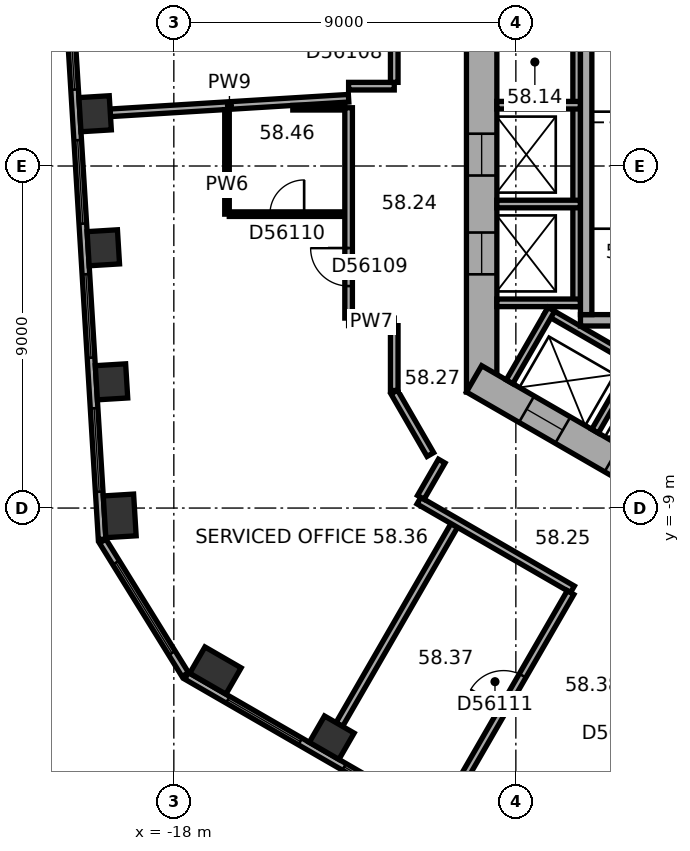
"""IFC4 building model, lengths in metres.
Left out: names, types, materials, properties, quantities, classifications, styles, units other than length and angle.
Written with IfcOpenShell. Run it as: python <this file> out.ifc"""

import sys

from ifc_helpers import new_model, si_unit, direction, frame, frame_2d, origin, origin_2d, place, context, subcontext, project, spatial, rectangle, extrude, element, fill, save


model = new_model("IFC4")
c1 = context("Model", 3, precision=1e-05, world=origin(), true_north=direction((0.0, 1.0)))
c2 = subcontext(c1, "Body", "Model", "MODEL_VIEW")
j1 = project(units=[si_unit("LENGTHUNIT", "METRE"), si_unit("PLANEANGLEUNIT", "RADIAN")], contexts=[c1])
p1 = place(None, origin())
s1 = spatial("IfcSite", under=j1, at=p1, CompositionType="ELEMENT")
p2 = place(p1, origin())
s2 = spatial("IfcBuilding", under=s1, at=p2, CompositionType="ELEMENT")
p3 = place(p2, frame((0.0, 0.0, 236.5)))
s3 = spatial("IfcBuildingStorey", under=s2, at=p3, CompositionType="ELEMENT", Elevation=236.5)
for number, where, z_axis, x_axis in (
    (1, (-20.071, 1.375, 0.0), (0.0, 0.0, 1.0), (0.061, -0.998, 0.0)),
    (2, (-19.856, -2.152, 0.0), (0.0, 0.0, 1.0), (0.061, -0.998, 0.0)),
    (3, (-19.64, -5.679, 0.0), (0.0, 0.0, 1.0), (0.061, -0.998, 0.0)),
):
    element("IfcColumn", number, at=place(p3, frame(where, z_axis=z_axis, x_axis=x_axis)), inside=s3, PredefinedType="COLUMN", context=c2, shape_type="SweptSolid", body=[
        extrude(rectangle(XDim=0.9, YDim=0.8, at=origin_2d()), origin(), (0.0, 0.0, 1.0), 3.7),
    ])
for number, where, z_axis, x_axis in (
    (4, (-19.424, -9.206, 0.0), (0.0, 0.0, 1.0), (0.061, -0.998, 0.0)),
    (5, (-16.906, -13.276, 0.0), (0.0, 0.0, 1.0), (0.866, -0.5, 0.0)),
):
    element("IfcColumn", number, at=place(p3, frame(where, z_axis=z_axis, x_axis=x_axis)), inside=s3, PredefinedType="COLUMN", context=c2, shape_type="SweptSolid", body=[
        extrude(rectangle(XDim=1.1, YDim=0.8, at=origin_2d()), origin(), (0.0, 0.0, 1.0), 3.7),
    ])
p4 = place(p3, frame((-13.845, -15.042, 0.0), z_axis=(0.0, 0.0, 1.0), x_axis=(0.866025403784, -0.5, 0.0)))
e6 = element("IfcColumn", 6, at=p4, inside=s3, PredefinedType="COLUMN", context=c2, shape_type="SweptSolid", body=[
    extrude(rectangle(XDim=0.9, YDim=0.8, at=origin_2d()), origin(), (0.0, 0.0, 1.0), 3.7),
])
p5 = place(p3, frame((-9.9, 5.947, 0.0), z_axis=(0.0, 0.0, 1.0), x_axis=(0.0, -1.0, 0.0)))
e7 = element("IfcWall", 7, at=p5, inside=s3, PredefinedType="SHEAR", context=c2, shape_type="SweptSolid", body=[
    extrude(rectangle(XDim=11.894, YDim=0.8, at=frame_2d((5.947, 0.0))), origin(), (0.0, 0.0, 1.0), 3.7),
])
p6 = place(p5, frame((5.097, 0.0, 0.0)))
e8 = element("IfcOpeningElement", 8, at=p6, cuts=e7, PredefinedType="OPENING", context=c2, shape_type="SweptSolid", body=[
    extrude(rectangle(XDim=1.1, YDim=2.1, at=frame_2d((0.55, 1.05))), frame((0.0, 0.41, 0.0), z_axis=(0.0, -1.0, 0.0), x_axis=(1.0, 0.0, 0.0)), (0.0, 0.0, 1.0), 0.82),
])
p7 = place(p5, frame((7.697, 0.0, 0.0)))
e9 = element("IfcOpeningElement", 9, at=p7, cuts=e7, PredefinedType="OPENING", context=c2, shape_type="SweptSolid", body=[
    extrude(rectangle(XDim=1.1, YDim=2.1, at=frame_2d((0.55, 1.05))), frame((0.0, 0.41, 0.0), z_axis=(0.0, -1.0, 0.0), x_axis=(1.0, 0.0, 0.0)), (0.0, 0.0, 1.0), 0.82),
])
p8 = place(p3, frame((-10.1, -5.6, 0.0), z_axis=(0.0, 0.0, 1.0), x_axis=(0.866023897231, -0.500002609418, 0.0)))
e10 = element("IfcWall", 10, at=p8, inside=s3, PredefinedType="SHEAR", context=c2, shape_type="SweptSolid", body=[
    extrude(rectangle(XDim=11.894, YDim=0.8, at=frame_2d((5.947, 0.0))), origin(), (0.0, 0.0, 1.0), 3.7),
])
p9 = place(p8, frame((6.147, 0.0, 0.0)))
e11 = element("IfcOpeningElement", 11, at=p9, cuts=e10, PredefinedType="OPENING", context=c2, shape_type="SweptSolid", body=[
    extrude(rectangle(XDim=1.5, YDim=2.1, at=frame_2d((0.75, 1.05))), frame((0.0, 0.41, 0.0), z_axis=(0.0, -1.0, 0.0), x_axis=(1.0, 0.0, 0.0)), (0.0, 0.0, 1.0), 0.82),
])
p10 = place(p8, frame((1.597, 0.0, 0.0)))
e12 = element("IfcOpeningElement", 12, at=p10, cuts=e10, PredefinedType="OPENING", context=c2, shape_type="SweptSolid", body=[
    extrude(rectangle(XDim=1.1, YDim=2.1, at=frame_2d((0.55, 1.05))), frame((0.0, 0.41, 0.0), z_axis=(0.0, -1.0, 0.0), x_axis=(1.0, 0.0, 0.0)), (0.0, 0.0, 1.0), 0.82),
])
p11 = place(p8, frame((4.197, 0.0, 0.0)))
e13 = element("IfcOpeningElement", 13, at=p11, cuts=e10, PredefinedType="OPENING", context=c2, shape_type="SweptSolid", body=[
    extrude(rectangle(XDim=1.1, YDim=2.1, at=frame_2d((0.55, 1.05))), frame((0.0, 0.41, 0.0), z_axis=(0.0, -1.0, 0.0), x_axis=(1.0, 0.0, 0.0)), (0.0, 0.0, 1.0), 0.82),
])
p12 = place(p3, frame((-21.038, 8.984, 0.0), z_axis=(0.0, 0.0, 1.0), x_axis=(0.061043935634, -0.998135079998, 0.0)))
e14 = element("IfcWall", 14, at=p12, inside=s3, PredefinedType="STANDARD", context=c2, shape_type="SweptSolid", body=[
    extrude(rectangle(XDim=18.841, YDim=0.2, at=frame_2d((9.421, 0.0))), origin(), (0.0, 0.0, 1.0), 3.7),
])
p13 = place(p12, frame((1.253, 0.0, 0.9)))
e15 = element("IfcOpeningElement", 15, at=p13, cuts=e14, PredefinedType="OPENING", context=c2, shape_type="SweptSolid", body=[
    extrude(rectangle(XDim=2.2, YDim=2.0, at=frame_2d((1.1, 1.0))), frame((0.0, 0.11, 0.0), z_axis=(0.0, -1.0, 0.0), x_axis=(1.0, 0.0, 0.0)), (0.0, 0.0, 1.0), 0.22),
])
p14 = place(p12, frame((4.786, 0.0, 0.9)))
e16 = element("IfcOpeningElement", 16, at=p14, cuts=e14, PredefinedType="OPENING", context=c2, shape_type="SweptSolid", body=[
    extrude(rectangle(XDim=2.2, YDim=2.0, at=frame_2d((1.1, 1.0))), frame((0.0, 0.11, 0.0), z_axis=(0.0, -1.0, 0.0), x_axis=(1.0, 0.0, 0.0)), (0.0, 0.0, 1.0), 0.22),
])
p15 = place(p12, frame((8.32, 0.0, 0.9)))
e17 = element("IfcOpeningElement", 17, at=p15, cuts=e14, PredefinedType="OPENING", context=c2, shape_type="SweptSolid", body=[
    extrude(rectangle(XDim=2.2, YDim=2.0, at=frame_2d((1.1, 1.0))), frame((0.0, 0.11, 0.0), z_axis=(0.0, -1.0, 0.0), x_axis=(1.0, 0.0, 0.0)), (0.0, 0.0, 1.0), 0.22),
])
p16 = place(p12, frame((11.854, 0.0, 0.9)))
e18 = element("IfcOpeningElement", 18, at=p16, cuts=e14, PredefinedType="OPENING", context=c2, shape_type="SweptSolid", body=[
    extrude(rectangle(XDim=2.2, YDim=2.0, at=frame_2d((1.1, 1.0))), frame((0.0, 0.11, 0.0), z_axis=(0.0, -1.0, 0.0), x_axis=(1.0, 0.0, 0.0)), (0.0, 0.0, 1.0), 0.22),
])
p17 = place(p12, frame((15.387, 0.0, 0.9)))
e19 = element("IfcOpeningElement", 19, at=p17, cuts=e14, PredefinedType="OPENING", context=c2, shape_type="SweptSolid", body=[
    extrude(rectangle(XDim=2.2, YDim=2.0, at=frame_2d((1.1, 1.0))), frame((0.0, 0.11, 0.0), z_axis=(0.0, -1.0, 0.0), x_axis=(1.0, 0.0, 0.0)), (0.0, 0.0, 1.0), 0.22),
])
p18 = place(p3, frame((-19.873, -9.869, 0.0), z_axis=(0.0, 0.0, 1.0), x_axis=(0.52626914263, -0.850318051975, 0.0)))
e20 = element("IfcWall", 20, at=p18, inside=s3, PredefinedType="STANDARD", context=c2, shape_type="SweptSolid", body=[
    extrude(rectangle(XDim=4.13, YDim=0.2, at=frame_2d((2.065, 0.0))), origin(), (0.0, 0.0, 1.0), 3.7),
])
p19 = place(p18, frame((0.665, 0.0, 0.9)))
e21 = element("IfcOpeningElement", 21, at=p19, cuts=e20, PredefinedType="OPENING", context=c2, shape_type="SweptSolid", body=[
    extrude(rectangle(XDim=2.8, YDim=2.0, at=frame_2d((1.4, 1.0))), frame((0.0, 0.11, 0.0), z_axis=(0.0, -1.0, 0.0), x_axis=(1.0, 0.0, 0.0)), (0.0, 0.0, 1.0), 0.22),
])
p20 = place(p3, frame((-17.664, -13.415, 0.0), z_axis=(0.0, 0.0, 1.0), x_axis=(0.866026555358, -0.49999800541, 0.0)))
e22 = element("IfcWall", 22, at=p20, inside=s3, PredefinedType="STANDARD", context=c2, shape_type="SweptSolid", body=[
    extrude(rectangle(XDim=18.841, YDim=0.2, at=frame_2d((9.421, 0.0))), origin(), (0.0, 0.0, 1.0), 3.7),
])
p21 = place(p20, frame((1.254, 0.0, 0.9)))
e23 = element("IfcOpeningElement", 23, at=p21, cuts=e22, PredefinedType="OPENING", context=c2, shape_type="SweptSolid", body=[
    extrude(rectangle(XDim=2.2, YDim=2.0, at=frame_2d((1.1, 1.0))), frame((0.0, 0.11, 0.0), z_axis=(0.0, -1.0, 0.0), x_axis=(1.0, 0.0, 0.0)), (0.0, 0.0, 1.0), 0.22),
])
p22 = place(p20, frame((4.788, 0.0, 0.9)))
e24 = element("IfcOpeningElement", 24, at=p22, cuts=e22, PredefinedType="OPENING", context=c2, shape_type="SweptSolid", body=[
    extrude(rectangle(XDim=2.2, YDim=2.0, at=frame_2d((1.1, 1.0))), frame((0.0, 0.11, 0.0), z_axis=(0.0, -1.0, 0.0), x_axis=(1.0, 0.0, 0.0)), (0.0, 0.0, 1.0), 0.22),
])
p23 = place(p20, frame((8.322, 0.0, 0.9)))
e25 = element("IfcOpeningElement", 25, at=p23, cuts=e22, PredefinedType="OPENING", context=c2, shape_type="SweptSolid", body=[
    extrude(rectangle(XDim=2.2, YDim=2.0, at=frame_2d((1.1, 1.0))), frame((0.0, 0.11, 0.0), z_axis=(0.0, -1.0, 0.0), x_axis=(1.0, 0.0, 0.0)), (0.0, 0.0, 1.0), 0.22),
])
p24 = place(p20, frame((11.855, 0.0, 0.9)))
e26 = element("IfcOpeningElement", 26, at=p24, cuts=e22, PredefinedType="OPENING", context=c2, shape_type="SweptSolid", body=[
    extrude(rectangle(XDim=2.2, YDim=2.0, at=frame_2d((1.1, 1.0))), frame((0.0, 0.11, 0.0), z_axis=(0.0, -1.0, 0.0), x_axis=(1.0, 0.0, 0.0)), (0.0, 0.0, 1.0), 0.22),
])
p25 = place(p20, frame((15.389, 0.0, 0.9)))
e27 = element("IfcOpeningElement", 27, at=p25, cuts=e22, PredefinedType="OPENING", context=c2, shape_type="SweptSolid", body=[
    extrude(rectangle(XDim=2.2, YDim=2.0, at=frame_2d((1.1, 1.0))), frame((0.0, 0.11, 0.0), z_axis=(0.0, -1.0, 0.0), x_axis=(1.0, 0.0, 0.0)), (0.0, 0.0, 1.0), 0.22),
])
p26 = place(p3, frame((-7.4, 4.3, 0.0), z_axis=(0.0, 0.0, 1.0), x_axis=(0.0, -1.0, 0.0)))
e28 = element("IfcWall", 28, at=p26, inside=s3, PredefinedType="PARTITIONING", context=c2, shape_type="SweptSolid", body=[
    extrude(rectangle(XDim=8.0, YDim=0.2, at=frame_2d((4.0, 0.0))), origin(), (0.0, 0.0, 1.0), 3.42),
])
for number, where, z_axis, x_axis in (
    (29, (-7.3, 1.6, 0.0), (0.0, 0.0, 1.0), (-1.0, 0.0, 0.0)),
    (30, (-7.3, -1.0, 0.0), (0.0, 0.0, 1.0), (-1.0, 0.0, 0.0)),
    (31, (-7.3, -3.6, 0.0), (0.0, 0.0, 1.0), (-1.0, 0.0, 0.0)),
):
    element("IfcWall", number, at=place(p3, frame(where, z_axis=z_axis, x_axis=x_axis)), inside=s3, PredefinedType="PARTITIONING", context=c2, shape_type="SweptSolid", body=[
        extrude(rectangle(XDim=2.2, YDim=0.2, at=frame_2d((1.1, 0.0))), origin(), (0.0, 0.0, 1.0), 3.42),
    ])
p27 = place(p3, frame((-8.203, -3.809, 0.0), z_axis=(0.0, 0.0, 1.0), x_axis=(0.866028230842, -0.499995103361, 0.0)))
e32 = element("IfcWall", 32, at=p27, inside=s3, PredefinedType="PARTITIONING", context=c2, shape_type="SweptSolid", body=[
    extrude(rectangle(XDim=5.4, YDim=0.2, at=frame_2d((2.7, 0.0))), origin(), (0.0, 0.0, 1.0), 3.42),
])
for number, where, z_axis, x_axis in (
    (33, (-8.067, -3.772, 0.0), (0.0, 0.0, 1.0), (-0.5, -0.866, 0.0)),
    (34, (-5.815, -5.072, 0.0), (0.0, 0.0, 1.0), (-0.5, -0.866, 0.0)),
):
    element("IfcWall", number, at=place(p3, frame(where, z_axis=z_axis, x_axis=x_axis)), inside=s3, PredefinedType="PARTITIONING", context=c2, shape_type="SweptSolid", body=[
        extrude(rectangle(XDim=2.2, YDim=0.2, at=frame_2d((1.1, 0.0))), origin(), (0.0, 0.0, 1.0), 3.42),
    ])
p28 = place(p3, frame((-2.6, -4.06, 0.0), z_axis=(0.0, 0.0, 1.0), x_axis=(-1.0, 0.0, 0.0)))
e35 = element("IfcWall", 35, at=p28, inside=s3, PredefinedType="SHEAR", context=c2, shape_type="SweptSolid", body=[
    extrude(rectangle(XDim=4.7, YDim=0.3, at=frame_2d((2.35, 0.0))), origin(), (0.0, 0.0, 1.0), 3.42),
])
p29 = place(p3, frame((-7.15, 3.15, 0.0), z_axis=(0.0, 0.0, 1.0), x_axis=(0.0, -1.0, 0.0)))
e36 = element("IfcWall", 36, at=p29, inside=s3, PredefinedType="SHEAR", context=c2, shape_type="SweptSolid", body=[
    extrude(rectangle(XDim=7.06, YDim=0.3, at=frame_2d((3.53, 0.0))), origin(), (0.0, 0.0, 1.0), 3.42),
])
p30 = place(p3, frame((-19.672, 1.4, 0.0), z_axis=(0.0, 0.0, 1.0), x_axis=(0.99813499784, 0.061045278997, 0.0)))
e37 = element("IfcWall", 37, at=p30, inside=s3, PredefinedType="PARTITIONING", context=c2, shape_type="SweptSolid", body=[
    extrude(rectangle(XDim=6.283, YDim=0.2, at=frame_2d((3.142, 0.0))), origin(), (0.0, 0.0, 1.0), 2.87),
])
p31 = place(p3, frame((-16.601, -1.267, 0.0), z_axis=(0.0, 0.0, 1.0), x_axis=(0.0, 1.0, 0.0)))
e38 = element("IfcWall", 38, at=p31, inside=s3, PredefinedType="PARTITIONING", context=c2, shape_type="SweptSolid", body=[
    extrude(rectangle(XDim=2.75, YDim=0.12, at=frame_2d((1.375, 0.0))), origin(), (0.0, 0.0, 1.0), 3.42),
])
p32 = place(p3, frame((-14.869, 1.533, 0.0), z_axis=(0.0, 0.0, 1.0), x_axis=(1.0, 0.0, 0.0)))
e39 = element("IfcWall", 39, at=p32, inside=s3, PredefinedType="PARTITIONING", context=c2, shape_type="SweptSolid", body=[
    extrude(rectangle(XDim=1.368, YDim=0.12, at=frame_2d((0.684, 0.0))), origin(), (0.0, 0.0, 1.0), 3.42),
])
p33 = place(p3, frame((-13.646, -14.696, 0.0), z_axis=(0.0, 0.0, 1.0), x_axis=(0.500006596359, 0.866021595341, 0.0)))
e40 = element("IfcWall", 40, at=p33, inside=s3, PredefinedType="PARTITIONING", context=c2, shape_type="SweptSolid", body=[
    extrude(rectangle(XDim=6.049, YDim=0.2, at=frame_2d((3.025, 0.0))), origin(), (0.0, 0.0, 1.0), 3.42),
])
p34 = place(p3, frame((-13.501, -1.267, 0.0), z_axis=(0.0, 0.0, 1.0), x_axis=(-1.0, 0.0, 0.0)))
e41 = element("IfcWall", 41, at=p34, inside=s3, PredefinedType="PARTITIONING", context=c2, shape_type="SweptSolid", body=[
    extrude(rectangle(XDim=3.04, YDim=0.12, at=frame_2d((1.52, 0.0))), origin(), (0.0, 0.0, 1.0), 3.42),
])
p35 = place(p34, frame((1.07, 0.0, 0.0)))
e42 = element("IfcOpeningElement", 42, at=p35, cuts=e41, PredefinedType="OPENING", context=c2, shape_type="SweptSolid", body=[
    extrude(rectangle(XDim=0.9, YDim=2.1, at=frame_2d((0.45, 1.05))), frame((0.0, 0.07, 0.0), z_axis=(0.0, -1.0, 0.0), x_axis=(1.0, 0.0, 0.0)), (0.0, 0.0, 1.0), 0.14),
])
p36 = place(p3, frame((-13.401, -4.101, 0.0), z_axis=(0.0, 0.0, 1.0), x_axis=(1.0, 0.0, 0.0)))
e43 = element("IfcWall", 43, at=p36, inside=s3, PredefinedType="PARTITIONING", context=c2, shape_type="SweptSolid", body=[
    extrude(rectangle(XDim=1.201, YDim=0.2, at=frame_2d((0.601, 0.0))), origin(), (0.0, 0.0, 1.0), 3.42),
])
p37 = place(p3, frame((-13.401, 1.533, 0.0), z_axis=(0.0, 0.0, 1.0), x_axis=(0.0, -1.0, 0.0)))
e44 = element("IfcWall", 44, at=p37, inside=s3, PredefinedType="PARTITIONING", context=c2, shape_type="SweptSolid", body=[
    extrude(rectangle(XDim=5.534, YDim=0.2, at=frame_2d((2.767, 0.0))), origin(), (0.0, 0.0, 1.0), 3.42),
])
p38 = place(p37, frame((3.692, 0.0, 0.0)))
e45 = element("IfcOpeningElement", 45, at=p38, cuts=e44, PredefinedType="OPENING", context=c2, shape_type="SweptSolid", body=[
    extrude(rectangle(XDim=1.0, YDim=2.1, at=frame_2d((0.5, 1.05))), frame((0.0, 0.11, 0.0), z_axis=(0.0, -1.0, 0.0), x_axis=(1.0, 0.0, 0.0)), (0.0, 0.0, 1.0), 0.22),
])
p39 = place(p3, frame((-12.2, -5.947, 0.0), z_axis=(0.0, 0.0, 1.0), x_axis=(0.500022797313, -0.86601224135, 0.0)))
e46 = element("IfcWall", 46, at=p39, inside=s3, PredefinedType="PARTITIONING", context=c2, shape_type="SweptSolid", body=[
    extrude(rectangle(XDim=1.9, YDim=0.2, at=frame_2d((0.95, 0.0))), origin(), (0.0, 0.0, 1.0), 3.42),
])
p40 = place(p3, frame((-12.2, -4.201, 0.0), z_axis=(0.0, 0.0, 1.0), x_axis=(0.0, -1.0, 0.0)))
e47 = element("IfcWall", 47, at=p40, inside=s3, PredefinedType="PARTITIONING", context=c2, shape_type="SweptSolid", body=[
    extrude(rectangle(XDim=1.706, YDim=0.2, at=frame_2d((0.853, 0.0))), origin(), (0.0, 0.0, 1.0), 3.42),
])
p41 = place(p3, frame((-12.2, 2.101, 0.0), z_axis=(0.0, 0.0, 1.0), x_axis=(-1.0, 0.0, 0.0)))
e48 = element("IfcWall", 48, at=p41, inside=s3, PredefinedType="PARTITIONING", context=c2, shape_type="SweptSolid", body=[
    extrude(rectangle(XDim=1.201, YDim=0.2, at=frame_2d((0.601, 0.0))), origin(), (0.0, 0.0, 1.0), 3.42),
])
p42 = place(p3, frame((-12.2, 5.697, 0.0), z_axis=(0.0, 0.0, 1.0), x_axis=(0.0, -1.0, 0.0)))
e49 = element("IfcWall", 49, at=p42, inside=s3, PredefinedType="PARTITIONING", context=c2, shape_type="SweptSolid", body=[
    extrude(rectangle(XDim=3.496, YDim=0.2, at=frame_2d((1.748, 0.0))), origin(), (0.0, 0.0, 1.0), 3.42),
])
p43 = place(p3, frame((-11.551, -8.805, 0.0), z_axis=(0.0, 0.0, 1.0), x_axis=(0.866038310922, -0.499977643516, 0.0)))
e50 = element("IfcWall", 50, at=p43, inside=s3, PredefinedType="PARTITIONING", context=c2, shape_type="SweptSolid", body=[
    extrude(rectangle(XDim=4.665, YDim=0.2, at=frame_2d((2.333, 0.0))), origin(), (0.0, 0.0, 1.0), 3.42),
])
p44 = place(p3, frame((-10.951, -7.765, 0.0), z_axis=(0.0, 0.0, 1.0), x_axis=(-0.499978356969, -0.866037899034, 0.0)))
e51 = element("IfcWall", 51, at=p44, inside=s3, PredefinedType="PARTITIONING", context=c2, shape_type="SweptSolid", body=[
    extrude(rectangle(XDim=1.101, YDim=0.2, at=frame_2d((0.551, 0.0))), origin(), (0.0, 0.0, 1.0), 3.42),
])
p45 = place(p3, frame((-10.585, -16.463, 0.0), z_axis=(0.0, 0.0, 1.0), x_axis=(0.499993802756, 0.866028981735, 0.0)))
e52 = element("IfcWall", 52, at=p45, inside=s3, PredefinedType="PARTITIONING", context=c2, shape_type="SweptSolid", body=[
    extrude(rectangle(XDim=6.049, YDim=0.2, at=frame_2d((3.024, 0.0))), origin(), (0.0, 0.0, 1.0), 2.87),
])
p46 = place(p45, frame((2.524, 0.0, 0.0)))
e53 = element("IfcOpeningElement", 53, at=p46, cuts=e52, PredefinedType="OPENING", context=c2, shape_type="SweptSolid", body=[
    extrude(rectangle(XDim=1.0, YDim=2.1, at=frame_2d((0.5, 1.05))), frame((0.0, 0.11, 0.0), z_axis=(0.0, -1.0, 0.0), x_axis=(1.0, 0.0, 0.0)), (0.0, 0.0, 1.0), 0.22),
])
p47 = place(p3, frame((-7.525, -18.23, 0.0), z_axis=(0.0, 0.0, 1.0), x_axis=(0.499983153418, 0.866035129944, 0.0)))
e54 = element("IfcWall", 54, at=p47, inside=s3, PredefinedType="PARTITIONING", context=c2, shape_type="SweptSolid", body=[
    extrude(rectangle(XDim=7.35, YDim=0.2, at=frame_2d((3.675, 0.0))), origin(), (0.0, 0.0, 1.0), 3.42),
])
p48 = place(p47, frame((2.975, 0.0, 0.0)))
e55 = element("IfcOpeningElement", 55, at=p48, cuts=e54, PredefinedType="OPENING", context=c2, shape_type="SweptSolid", body=[
    extrude(rectangle(XDim=1.0, YDim=2.1, at=frame_2d((0.5, 1.05))), frame((0.0, 0.11, 0.0), z_axis=(0.0, -1.0, 0.0), x_axis=(1.0, 0.0, 0.0)), (0.0, 0.0, 1.0), 0.22),
])
p49 = place(p14, origin())
e56 = element("IfcWindow", 56, at=p49, inside=s3, PartitioningType="SINGLE_PANEL", PredefinedType="WINDOW", context=c2, shape_type="SweptSolid", body=[
    extrude(rectangle(XDim=2.2, YDim=2.0, at=frame_2d((1.1, 1.0))), frame((0.0, 0.03, 0.0), z_axis=(0.0, -1.0, 0.0), x_axis=(1.0, 0.0, 0.0)), (0.0, 0.0, 1.0), 0.06),
])
fill(e16, e56)
p50 = place(p15, origin())
e57 = element("IfcWindow", 57, at=p50, inside=s3, PartitioningType="SINGLE_PANEL", PredefinedType="WINDOW", context=c2, shape_type="SweptSolid", body=[
    extrude(rectangle(XDim=2.2, YDim=2.0, at=frame_2d((1.1, 1.0))), frame((0.0, 0.03, 0.0), z_axis=(0.0, -1.0, 0.0), x_axis=(1.0, 0.0, 0.0)), (0.0, 0.0, 1.0), 0.06),
])
fill(e17, e57)
p51 = place(p16, origin())
e58 = element("IfcWindow", 58, at=p51, inside=s3, PartitioningType="SINGLE_PANEL", PredefinedType="WINDOW", context=c2, shape_type="SweptSolid", body=[
    extrude(rectangle(XDim=2.2, YDim=2.0, at=frame_2d((1.1, 1.0))), frame((0.0, 0.03, 0.0), z_axis=(0.0, -1.0, 0.0), x_axis=(1.0, 0.0, 0.0)), (0.0, 0.0, 1.0), 0.06),
])
fill(e18, e58)
p52 = place(p17, origin())
e59 = element("IfcWindow", 59, at=p52, inside=s3, PartitioningType="SINGLE_PANEL", PredefinedType="WINDOW", context=c2, shape_type="SweptSolid", body=[
    extrude(rectangle(XDim=2.2, YDim=2.0, at=frame_2d((1.1, 1.0))), frame((0.0, 0.03, 0.0), z_axis=(0.0, -1.0, 0.0), x_axis=(1.0, 0.0, 0.0)), (0.0, 0.0, 1.0), 0.06),
])
fill(e19, e59)
p53 = place(p19, origin())
e60 = element("IfcWindow", 60, at=p53, inside=s3, PartitioningType="SINGLE_PANEL", PredefinedType="WINDOW", context=c2, shape_type="SweptSolid", body=[
    extrude(rectangle(XDim=2.8, YDim=2.0, at=frame_2d((1.4, 1.0))), frame((0.0, 0.03, 0.0), z_axis=(0.0, -1.0, 0.0), x_axis=(1.0, 0.0, 0.0)), (0.0, 0.0, 1.0), 0.06),
])
fill(e21, e60)
p54 = place(p21, origin())
e61 = element("IfcWindow", 61, at=p54, inside=s3, PartitioningType="SINGLE_PANEL", PredefinedType="WINDOW", context=c2, shape_type="SweptSolid", body=[
    extrude(rectangle(XDim=2.2, YDim=2.0, at=frame_2d((1.1, 1.0))), frame((0.0, 0.03, 0.0), z_axis=(0.0, -1.0, 0.0), x_axis=(1.0, 0.0, 0.0)), (0.0, 0.0, 1.0), 0.06),
])
fill(e23, e61)
p55 = place(p22, origin())
e62 = element("IfcWindow", 62, at=p55, inside=s3, PartitioningType="SINGLE_PANEL", PredefinedType="WINDOW", context=c2, shape_type="SweptSolid", body=[
    extrude(rectangle(XDim=2.2, YDim=2.0, at=frame_2d((1.1, 1.0))), frame((0.0, 0.03, 0.0), z_axis=(0.0, -1.0, 0.0), x_axis=(1.0, 0.0, 0.0)), (0.0, 0.0, 1.0), 0.06),
])
fill(e24, e62)
p56 = place(p6, origin())
e63 = element("IfcDoor", 63, at=p56, inside=s3, OperationType="DOUBLE_DOOR_SLIDING", PredefinedType="DOOR", context=c2, shape_type="SweptSolid", body=[
    extrude(rectangle(XDim=1.1, YDim=2.1, at=frame_2d((0.55, 1.05))), frame((0.0, 0.025, 0.0), z_axis=(0.0, -1.0, 0.0), x_axis=(1.0, 0.0, 0.0)), (0.0, 0.0, 1.0), 0.05),
])
fill(e8, e63)
p57 = place(p7, origin())
e64 = element("IfcDoor", 64, at=p57, inside=s3, OperationType="DOUBLE_DOOR_SLIDING", PredefinedType="DOOR", context=c2, shape_type="SweptSolid", body=[
    extrude(rectangle(XDim=1.1, YDim=2.1, at=frame_2d((0.55, 1.05))), frame((0.0, 0.025, 0.0), z_axis=(0.0, -1.0, 0.0), x_axis=(1.0, 0.0, 0.0)), (0.0, 0.0, 1.0), 0.05),
])
fill(e9, e64)
p58 = place(p10, origin())
e65 = element("IfcDoor", 65, at=p58, inside=s3, OperationType="DOUBLE_DOOR_SLIDING", PredefinedType="DOOR", context=c2, shape_type="SweptSolid", body=[
    extrude(rectangle(XDim=1.1, YDim=2.1, at=frame_2d((0.55, 1.05))), frame((0.0, 0.025, 0.0), z_axis=(0.0, -1.0, 0.0), x_axis=(1.0, 0.0, 0.0)), (0.0, 0.0, 1.0), 0.05),
])
fill(e12, e65)
p59 = place(p38, origin())
e66 = element("IfcDoor", 66, at=p59, inside=s3, OperationType="SINGLE_SWING_LEFT", PredefinedType="DOOR", context=c2, shape_type="SweptSolid", body=[
    extrude(rectangle(XDim=1.0, YDim=2.1, at=frame_2d((0.5, 1.05))), frame((0.0, 0.025, 0.0), z_axis=(0.0, -1.0, 0.0), x_axis=(1.0, 0.0, 0.0)), (0.0, 0.0, 1.0), 0.05),
])
fill(e45, e66)
p60 = place(p35, origin())
e67 = element("IfcDoor", 67, at=p60, inside=s3, OperationType="SINGLE_SWING_LEFT", PredefinedType="DOOR", context=c2, shape_type="SweptSolid", body=[
    extrude(rectangle(XDim=0.9, YDim=2.1, at=frame_2d((0.45, 1.05))), frame((0.0, 0.025, 0.0), z_axis=(0.0, -1.0, 0.0), x_axis=(1.0, 0.0, 0.0)), (0.0, 0.0, 1.0), 0.05),
])
fill(e42, e67)
p61 = place(p46, origin())
e68 = element("IfcDoor", 68, at=p61, inside=s3, OperationType="SINGLE_SWING_LEFT", PredefinedType="DOOR", context=c2, shape_type="SweptSolid", body=[
    extrude(rectangle(XDim=1.0, YDim=2.1, at=frame_2d((0.5, 1.05))), frame((0.0, 0.025, 0.0), z_axis=(0.0, -1.0, 0.0), x_axis=(1.0, 0.0, 0.0)), (0.0, 0.0, 1.0), 0.05),
])
fill(e53, e68)
save(model, sys.argv[1])
